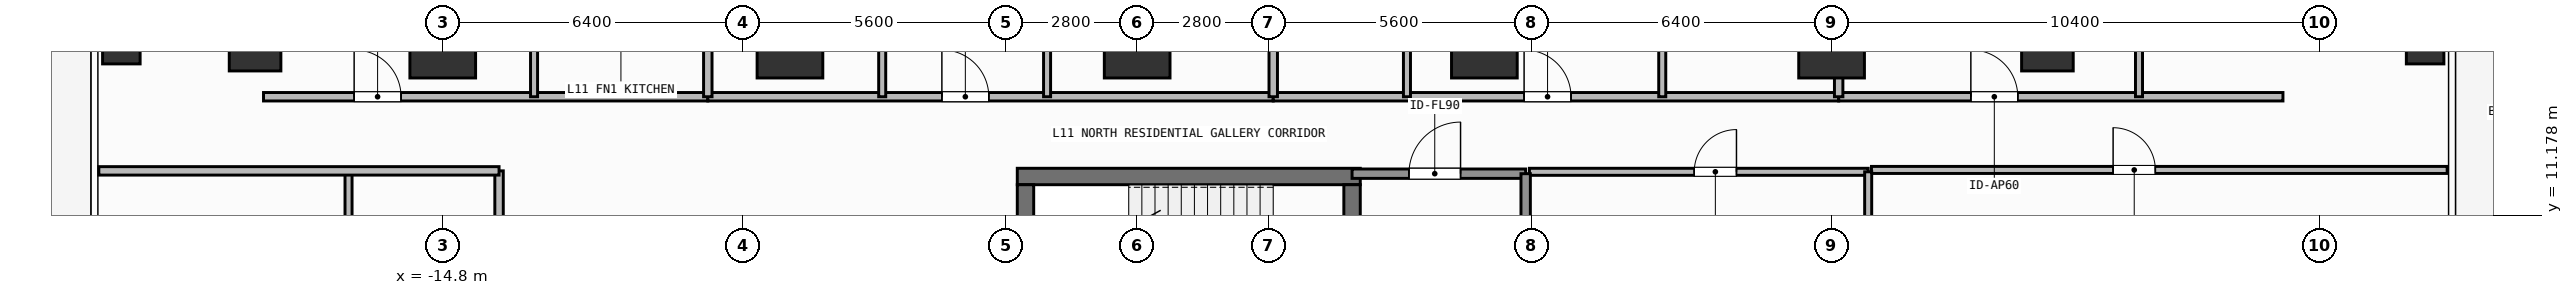
"""IFC4 building model, lengths in metres.
Left out: names, types, materials, properties, quantities, classifications, styles, units other than length and angle.
Written with IfcOpenShell. Run it as: python <this file> out.ifc"""

import sys

from ifc_helpers import new_model, si_unit, direction, frame, frame_2d, origin, origin_2d, place, context, subcontext, project, spatial, rectangle, hollow_rectangle, extrude, element, fill, save


model = new_model("IFC4")
c1 = context("Model", 3, precision=1e-05, world=origin(), true_north=direction((0.0, 1.0)))
c2 = subcontext(c1, "Body", "Model", "MODEL_VIEW")
j1 = project(units=[si_unit("LENGTHUNIT", "METRE"), si_unit("PLANEANGLEUNIT", "RADIAN")], contexts=[c1])
p1 = place(None, origin())
s1 = spatial("IfcSite", under=j1, at=p1, CompositionType="ELEMENT")
p2 = place(p1, origin())
s2 = spatial("IfcBuilding", under=s1, at=p2, CompositionType="ELEMENT")
p3 = place(p2, frame((0.0, 0.0, 42.3)))
s3 = spatial("IfcBuildingStorey", under=s2, at=p3, CompositionType="ELEMENT", Elevation=42.3)
p4 = place(p3, frame((-2.555, 12.0, 0.0), z_axis=(0.0, 0.0, 1.0), x_axis=(1.0, 0.0, 0.0)))
e1 = element("IfcWall", 1, at=p4, inside=s3, PredefinedType="SHEAR", context=c2, shape_type="SweptSolid", body=[
    extrude(rectangle(XDim=7.31, YDim=0.35, at=frame_2d((3.655, 0.0))), origin(), (0.0, 0.0, 1.0), 3.9),
])
p5 = place(p3, frame((-2.38, 8.9, 0.0), z_axis=(0.0, 0.0, 1.0), x_axis=(0.0, 1.0, 0.0)))
e2 = element("IfcWall", 2, at=p5, inside=s3, PredefinedType="SHEAR", context=c2, shape_type="SweptSolid", body=[
    extrude(rectangle(XDim=2.925, YDim=0.35, at=frame_2d((1.462, 0.0))), origin(), (0.0, 0.0, 1.0), 3.9),
])
p6 = place(p3, frame((4.58, 11.825, 0.0), z_axis=(0.0, 0.0, 1.0), x_axis=(0.0, -1.0, 0.0)))
e3 = element("IfcWall", 3, at=p6, inside=s3, PredefinedType="SHEAR", context=c2, shape_type="SweptSolid", body=[
    extrude(rectangle(XDim=2.925, YDim=0.35, at=frame_2d((1.462, 0.0))), origin(), (0.0, 0.0, 1.0), 3.9),
])
p7 = place(p6, frame((0.913, 0.0, 0.0)))
e4 = element("IfcOpeningElement", 4, at=p7, cuts=e3, PredefinedType="OPENING", context=c2, shape_type="SweptSolid", body=[
    extrude(rectangle(XDim=1.1, YDim=2.15, at=frame_2d((0.55, 1.075))), frame((0.0, 0.185, 0.0), z_axis=(0.0, -1.0, 0.0), x_axis=(1.0, 0.0, 0.0)), (0.0, 0.0, 1.0), 0.37),
])
for number, where, z_axis, x_axis in (
    (5, (-14.8, 14.8, 0.0), (0.0, 0.0, 1.0), (1.0, 0.0, 0.0)),
    (6, (-7.4, 14.8, 0.0), (0.0, 0.0, 1.0), (1.0, 0.0, 0.0)),
    (7, (0.0, 14.8, 0.0), (0.0, 0.0, 1.0), (1.0, 0.0, 0.0)),
    (8, (7.4, 14.8, 0.0), (0.0, 0.0, 1.0), (1.0, 0.0, 0.0)),
    (9, (14.8, 14.8, 0.0), (0.0, 0.0, 1.0), (1.0, 0.0, 0.0)),
):
    element("IfcColumn", number, at=place(p3, frame(where, z_axis=z_axis, x_axis=x_axis)), inside=s3, PredefinedType="COLUMN", context=c2, shape_type="SweptSolid", body=[
        extrude(rectangle(XDim=1.4, YDim=1.4, at=origin_2d()), origin(), (0.0, 0.0, 1.0), 3.9),
    ])
for number, where, z_axis, x_axis in (
    (10, (-18.8, 14.8, 0.0), (0.0, 0.0, 1.0), (1.0, 0.0, 0.0)),
    (11, (19.4, 14.8, 0.0), (0.0, 0.0, 1.0), (1.0, 0.0, 0.0)),
):
    element("IfcColumn", number, at=place(p3, frame(where, z_axis=z_axis, x_axis=x_axis)), inside=s3, PredefinedType="COLUMN", context=c2, shape_type="SweptSolid", body=[
        extrude(rectangle(XDim=1.1, YDim=1.1, at=origin_2d()), origin(), (0.0, 0.0, 1.0), 3.9),
    ])
for number, where, z_axis, x_axis in (
    (12, (-21.65, 14.8, 0.0), (0.0, 0.0, 1.0), (1.0, 0.0, 0.0)),
    (13, (27.45, 14.8, 0.0), (0.0, 0.0, 1.0), (1.0, 0.0, 0.0)),
):
    element("IfcColumn", number, at=place(p3, frame(where, z_axis=z_axis, x_axis=x_axis)), inside=s3, PredefinedType="COLUMN", context=c2, shape_type="SweptSolid", body=[
        extrude(hollow_rectangle(XDim=0.8, YDim=0.8, WallThickness=0.036, at=origin_2d()), origin(), (0.0, 0.0, 1.0), 3.9),
    ])
p8 = place(p3, frame((4.58, 12.06, 0.0), z_axis=(0.0, 0.0, 1.0), x_axis=(1.0, 0.0, 0.0)))
e14 = element("IfcWall", 14, at=p8, inside=s3, PredefinedType="SOLIDWALL", context=c2, shape_type="SweptSolid", body=[
    extrude(rectangle(XDim=3.7, YDim=0.2, at=frame_2d((1.85, 0.0))), origin(), (0.0, 0.0, 1.0), 3.68),
])
p9 = place(p8, frame((1.212, 0.0, 0.0)))
e15 = element("IfcOpeningElement", 15, at=p9, cuts=e14, PredefinedType="OPENING", context=c2, shape_type="SweptSolid", body=[
    extrude(rectangle(XDim=1.1, YDim=2.15, at=frame_2d((0.55, 1.075))), frame((0.0, 0.11, 0.0), z_axis=(0.0, -1.0, 0.0), x_axis=(1.0, 0.0, 0.0)), (0.0, 0.0, 1.0), 0.22),
])
p10 = place(p3, frame((8.36, 12.1, 0.0), z_axis=(0.0, 0.0, 1.0), x_axis=(1.0, 0.0, 0.0)))
e16 = element("IfcWall", 16, at=p10, inside=s3, PredefinedType="PARTITIONING", context=c2, shape_type="SweptSolid", body=[
    extrude(rectangle(XDim=7.22, YDim=0.15, at=frame_2d((3.61, 0.0))), origin(), (0.0, 0.0, 1.0), 3.68),
])
p11 = place(p10, frame((3.513, 0.0, 0.0)))
e17 = element("IfcOpeningElement", 17, at=p11, cuts=e16, PredefinedType="OPENING", context=c2, shape_type="SweptSolid", body=[
    extrude(rectangle(XDim=0.9, YDim=2.1, at=frame_2d((0.45, 1.05))), frame((0.0, 0.085, 0.0), z_axis=(0.0, -1.0, 0.0), x_axis=(1.0, 0.0, 0.0)), (0.0, 0.0, 1.0), 0.17),
])
p12 = place(p3, frame((-18.62, 13.7, 0.0), z_axis=(0.0, 0.0, 1.0), x_axis=(1.0, 0.0, 0.0)))
e18 = element("IfcWall", 18, at=p12, inside=s3, PredefinedType="PARTITIONING", context=c2, shape_type="SweptSolid", body=[
    extrude(rectangle(XDim=9.469, YDim=0.18, at=frame_2d((4.735, 0.0))), origin(), (0.0, 0.0, 1.0), 3.68),
])
p13 = place(p12, frame((1.931, 0.0, 0.0)))
e19 = element("IfcOpeningElement", 19, at=p13, cuts=e18, PredefinedType="OPENING", context=c2, shape_type="SweptSolid", body=[
    extrude(rectangle(XDim=1.0, YDim=2.2, at=frame_2d((0.5, 1.1))), frame((0.0, 0.1, 0.0), z_axis=(0.0, -1.0, 0.0), x_axis=(1.0, 0.0, 0.0)), (0.0, 0.0, 1.0), 0.2),
])
p14 = place(p3, frame((-12.854, 13.7, 0.0), z_axis=(0.0, 0.0, 1.0), x_axis=(0.0, 1.0, 0.0)))
e20 = element("IfcWall", 20, at=p14, inside=s3, PredefinedType="PARTITIONING", context=c2, shape_type="SweptSolid", body=[
    extrude(rectangle(XDim=3.899, YDim=0.15, at=frame_2d((1.95, 0.0))), origin(), (0.0, 0.0, 1.0), 3.68),
])
p15 = place(p14, frame((1.865, 0.0, 0.0)))
e21 = element("IfcOpeningElement", 21, at=p15, cuts=e20, PredefinedType="OPENING", context=c2, shape_type="SweptSolid", body=[
    extrude(rectangle(XDim=0.85, YDim=2.1, at=frame_2d((0.425, 1.05))), frame((0.0, 0.085, 0.0), z_axis=(0.0, -1.0, 0.0), x_axis=(1.0, 0.0, 0.0)), (0.0, 0.0, 1.0), 0.17),
])
p16 = place(p3, frame((-9.151, 13.7, 0.0), z_axis=(0.0, 0.0, 1.0), x_axis=(1.0, 0.0, 0.0)))
e22 = element("IfcWall", 22, at=p16, inside=s3, PredefinedType="PARTITIONING", context=c2, shape_type="SweptSolid", body=[
    extrude(rectangle(XDim=12.051, YDim=0.18, at=frame_2d((6.025, 0.0))), origin(), (0.0, 0.0, 1.0), 3.68),
])
p17 = place(p16, frame((4.989, 0.0, 0.0)))
e23 = element("IfcOpeningElement", 23, at=p17, cuts=e22, PredefinedType="OPENING", context=c2, shape_type="SweptSolid", body=[
    extrude(rectangle(XDim=1.0, YDim=2.2, at=frame_2d((0.5, 1.1))), frame((0.0, 0.1, 0.0), z_axis=(0.0, -1.0, 0.0), x_axis=(1.0, 0.0, 0.0)), (0.0, 0.0, 1.0), 0.2),
])
p18 = place(p3, frame((-5.434, 13.7, 0.0), z_axis=(0.0, 0.0, 1.0), x_axis=(0.0, 1.0, 0.0)))
e24 = element("IfcWall", 24, at=p18, inside=s3, PredefinedType="PARTITIONING", context=c2, shape_type="SweptSolid", body=[
    extrude(rectangle(XDim=7.09, YDim=0.15, at=frame_2d((3.545, 0.0))), origin(), (0.0, 0.0, 1.0), 3.68),
])
p19 = place(p18, frame((3.03, 0.0, 0.0)))
e25 = element("IfcOpeningElement", 25, at=p19, cuts=e24, PredefinedType="OPENING", context=c2, shape_type="SweptSolid", body=[
    extrude(rectangle(XDim=0.85, YDim=2.1, at=frame_2d((0.425, 1.05))), frame((0.0, 0.085, 0.0), z_axis=(0.0, -1.0, 0.0), x_axis=(1.0, 0.0, 0.0)), (0.0, 0.0, 1.0), 0.17),
])
p20 = place(p3, frame((-1.92, 13.7, 0.0), z_axis=(0.0, 0.0, 1.0), x_axis=(0.0, 1.0, 0.0)))
e26 = element("IfcWall", 26, at=p20, inside=s3, PredefinedType="PARTITIONING", context=c2, shape_type="SweptSolid", body=[
    extrude(rectangle(XDim=4.963, YDim=0.15, at=frame_2d((2.481, 0.0))), origin(), (0.0, 0.0, 1.0), 3.68),
])
p21 = place(p20, frame((2.056, 0.0, 0.0)))
e27 = element("IfcOpeningElement", 27, at=p21, cuts=e26, PredefinedType="OPENING", context=c2, shape_type="SweptSolid", body=[
    extrude(rectangle(XDim=0.85, YDim=2.1, at=frame_2d((0.425, 1.05))), frame((0.0, 0.085, 0.0), z_axis=(0.0, -1.0, 0.0), x_axis=(1.0, 0.0, 0.0)), (0.0, 0.0, 1.0), 0.17),
])
p22 = place(p3, frame((2.9, 13.7, 0.0), z_axis=(0.0, 0.0, 1.0), x_axis=(1.0, 0.0, 0.0)))
e28 = element("IfcWall", 28, at=p22, inside=s3, PredefinedType="PARTITIONING", context=c2, shape_type="SweptSolid", body=[
    extrude(rectangle(XDim=12.051, YDim=0.18, at=frame_2d((6.025, 0.0))), origin(), (0.0, 0.0, 1.0), 3.68),
])
p23 = place(p22, frame((5.347, 0.0, 0.0)))
e29 = element("IfcOpeningElement", 29, at=p23, cuts=e28, PredefinedType="OPENING", context=c2, shape_type="SweptSolid", body=[
    extrude(rectangle(XDim=1.0, YDim=2.2, at=frame_2d((0.5, 1.1))), frame((0.0, 0.1, 0.0), z_axis=(0.0, -1.0, 0.0), x_axis=(1.0, 0.0, 0.0)), (0.0, 0.0, 1.0), 0.2),
])
p24 = place(p3, frame((5.75, 13.7, 0.0), z_axis=(0.0, 0.0, 1.0), x_axis=(0.0, 1.0, 0.0)))
e30 = element("IfcWall", 30, at=p24, inside=s3, PredefinedType="PARTITIONING", context=c2, shape_type="SweptSolid", body=[
    extrude(rectangle(XDim=7.09, YDim=0.15, at=frame_2d((3.545, 0.0))), origin(), (0.0, 0.0, 1.0), 3.68),
])
p25 = place(p24, frame((3.03, 0.0, 0.0)))
e31 = element("IfcOpeningElement", 31, at=p25, cuts=e30, PredefinedType="OPENING", context=c2, shape_type="SweptSolid", body=[
    extrude(rectangle(XDim=0.85, YDim=2.1, at=frame_2d((0.425, 1.05))), frame((0.0, 0.085, 0.0), z_axis=(0.0, -1.0, 0.0), x_axis=(1.0, 0.0, 0.0)), (0.0, 0.0, 1.0), 0.17),
])
p26 = place(p3, frame((11.191, 13.7, 0.0), z_axis=(0.0, 0.0, 1.0), x_axis=(0.0, 1.0, 0.0)))
e32 = element("IfcWall", 32, at=p26, inside=s3, PredefinedType="PARTITIONING", context=c2, shape_type="SweptSolid", body=[
    extrude(rectangle(XDim=4.857, YDim=0.15, at=frame_2d((2.428, 0.0))), origin(), (0.0, 0.0, 1.0), 3.68),
])
p27 = place(p26, frame((1.916, 0.0, 0.0)))
e33 = element("IfcOpeningElement", 33, at=p27, cuts=e32, PredefinedType="OPENING", context=c2, shape_type="SweptSolid", body=[
    extrude(rectangle(XDim=0.85, YDim=2.1, at=frame_2d((0.425, 1.05))), frame((0.0, 0.085, 0.0), z_axis=(0.0, -1.0, 0.0), x_axis=(1.0, 0.0, 0.0)), (0.0, 0.0, 1.0), 0.17),
])
p28 = place(p3, frame((14.951, 13.7, 0.0), z_axis=(0.0, 0.0, 1.0), x_axis=(1.0, 0.0, 0.0)))
e34 = element("IfcWall", 34, at=p28, inside=s3, PredefinedType="PARTITIONING", context=c2, shape_type="SweptSolid", body=[
    extrude(rectangle(XDim=9.469, YDim=0.18, at=frame_2d((4.734, 0.0))), origin(), (0.0, 0.0, 1.0), 3.68),
])
p29 = place(p28, frame((2.817, 0.0, 0.0)))
e35 = element("IfcOpeningElement", 35, at=p29, cuts=e34, PredefinedType="OPENING", context=c2, shape_type="SweptSolid", body=[
    extrude(rectangle(XDim=1.0, YDim=2.2, at=frame_2d((0.5, 1.1))), frame((0.0, 0.1, 0.0), z_axis=(0.0, -1.0, 0.0), x_axis=(1.0, 0.0, 0.0)), (0.0, 0.0, 1.0), 0.2),
])
p30 = place(p3, frame((21.352, 13.7, 0.0), z_axis=(0.0, 0.0, 1.0), x_axis=(0.0, 1.0, 0.0)))
e36 = element("IfcWall", 36, at=p30, inside=s3, PredefinedType="PARTITIONING", context=c2, shape_type="SweptSolid", body=[
    extrude(rectangle(XDim=3.899, YDim=0.15, at=frame_2d((1.95, 0.0))), origin(), (0.0, 0.0, 1.0), 3.68),
])
p31 = place(p30, frame((1.695, 0.0, 0.0)))
e37 = element("IfcOpeningElement", 37, at=p31, cuts=e36, PredefinedType="OPENING", context=c2, shape_type="SweptSolid", body=[
    extrude(rectangle(XDim=0.85, YDim=2.1, at=frame_2d((0.425, 1.05))), frame((0.0, 0.085, 0.0), z_axis=(0.0, -1.0, 0.0), x_axis=(1.0, 0.0, 0.0)), (0.0, 0.0, 1.0), 0.17),
])
p32 = place(p3, frame((-13.6, -12.12, 0.0), z_axis=(0.0, 0.0, 1.0), x_axis=(0.0, 1.0, 0.0)))
e38 = element("IfcWall", 38, at=p32, inside=s3, PredefinedType="PARTITIONING", context=c2, shape_type="SweptSolid", body=[
    extrude(rectangle(XDim=24.24, YDim=0.18, at=frame_2d((12.12, 0.0))), origin(), (0.0, 0.0, 1.0), 3.68),
])
p33 = place(p32, frame((9.829, 0.0, 0.0)))
e39 = element("IfcOpeningElement", 39, at=p33, cuts=e38, PredefinedType="OPENING", context=c2, shape_type="SweptSolid", body=[
    extrude(rectangle(XDim=1.0, YDim=2.2, at=frame_2d((0.5, 1.1))), frame((0.0, 0.1, 0.0), z_axis=(0.0, -1.0, 0.0), x_axis=(1.0, 0.0, 0.0)), (0.0, 0.0, 1.0), 0.2),
])
p34 = place(p3, frame((15.65, 12.14, 0.0), z_axis=(0.0, 0.0, 1.0), x_axis=(1.0, 0.0, 0.0)))
e40 = element("IfcWall", 40, at=p34, inside=s3, PredefinedType="PARTITIONING", context=c2, shape_type="SweptSolid", body=[
    extrude(rectangle(XDim=12.27, YDim=0.15, at=frame_2d((6.135, 0.0))), origin(), (0.0, 0.0, 1.0), 3.68),
])
p35 = place(p34, frame((5.15, 0.0, 0.0)))
e41 = element("IfcOpeningElement", 41, at=p35, cuts=e40, PredefinedType="OPENING", context=c2, shape_type="SweptSolid", body=[
    extrude(rectangle(XDim=0.9, YDim=2.1, at=frame_2d((0.45, 1.05))), frame((0.0, 0.085, 0.0), z_axis=(0.0, -1.0, 0.0), x_axis=(1.0, 0.0, 0.0)), (0.0, 0.0, 1.0), 0.17),
])
p36 = place(p3, frame((8.28, 8.95, 0.0), z_axis=(0.0, 0.0, 1.0), x_axis=(0.0, 1.0, 0.0)))
e42 = element("IfcWall", 42, at=p36, inside=s3, PredefinedType="SOLIDWALL", context=c2, shape_type="SweptSolid", body=[
    extrude(rectangle(XDim=3.11, YDim=0.2, at=frame_2d((1.555, 0.0))), origin(), (0.0, 0.0, 1.0), 3.68),
])
p37 = place(p3, frame((15.58, 5.85, 0.0), z_axis=(0.0, 0.0, 1.0), x_axis=(0.0, 1.0, 0.0)))
e43 = element("IfcWall", 43, at=p37, inside=s3, PredefinedType="PARTITIONING", context=c2, shape_type="SweptSolid", body=[
    extrude(rectangle(XDim=6.25, YDim=0.15, at=frame_2d((3.125, 0.0))), origin(), (0.0, 0.0, 1.0), 3.68),
])
for number, where, z_axis, x_axis in (
    (44, (-9.151, 13.7, 0.0), (0.0, 0.0, 1.0), (0.0, 1.0, 0.0)),
    (45, (2.9, 13.7, 0.0), (0.0, 0.0, 1.0), (0.0, 1.0, 0.0)),
):
    element("IfcWall", number, at=place(p3, frame(where, z_axis=z_axis, x_axis=x_axis)), inside=s3, PredefinedType="PARTITIONING", context=c2, shape_type="SweptSolid", body=[
        extrude(rectangle(XDim=11.33, YDim=0.18, at=frame_2d((5.665, 0.0))), origin(), (0.0, 0.0, 1.0), 3.68),
    ])
p38 = place(p3, frame((14.951, 13.7, 0.0), z_axis=(0.0, 0.0, 1.0), x_axis=(0.0, 1.0, 0.0)))
e46 = element("IfcWall", 46, at=p38, inside=s3, PredefinedType="PARTITIONING", context=c2, shape_type="SweptSolid", body=[
    extrude(rectangle(XDim=11.33, YDim=0.18, at=frame_2d((5.665, 0.0))), origin(), (0.0, 0.0, 1.0), 3.082),
])
p39 = place(p3, frame((-16.808, 5.436, 0.0), z_axis=(0.0, 0.0, 1.0), x_axis=(0.0, 1.0, 0.0)))
e47 = element("IfcWall", 47, at=p39, inside=s3, PredefinedType="PARTITIONING", context=c2, shape_type="SweptSolid", body=[
    extrude(rectangle(XDim=6.684, YDim=0.15, at=frame_2d((3.342, 0.0))), origin(), (0.0, 0.0, 1.0), 3.68),
])
p40 = place(p3, frame((-22.13, 12.12, 0.0), z_axis=(0.0, 0.0, 1.0), x_axis=(1.0, 0.0, 0.0)))
e48 = element("IfcWall", 48, at=p40, inside=s3, PredefinedType="PARTITIONING", context=c2, shape_type="SweptSolid", body=[
    extrude(rectangle(XDim=8.53, YDim=0.18, at=frame_2d((4.265, 0.0))), origin(), (0.0, 0.0, 1.0), 3.68),
])
p41 = place(p9, origin())
e49 = element("IfcDoor", 49, at=p41, inside=s3, OperationType="SINGLE_SWING_RIGHT", PredefinedType="DOOR", context=c2, shape_type="SweptSolid", body=[
    extrude(rectangle(XDim=1.1, YDim=2.15, at=frame_2d((0.55, 1.075))), frame((0.0, 0.025, 0.0), z_axis=(0.0, -1.0, 0.0), x_axis=(1.0, 0.0, 0.0)), (0.0, 0.0, 1.0), 0.05),
])
fill(e15, e49)
p42 = place(p11, origin())
e50 = element("IfcDoor", 50, at=p42, inside=s3, OperationType="SINGLE_SWING_RIGHT", PredefinedType="DOOR", context=c2, shape_type="SweptSolid", body=[
    extrude(rectangle(XDim=0.9, YDim=2.1, at=frame_2d((0.45, 1.05))), frame((0.0, 0.025, 0.0), z_axis=(0.0, -1.0, 0.0), x_axis=(1.0, 0.0, 0.0)), (0.0, 0.0, 1.0), 0.05),
])
fill(e17, e50)
p43 = place(p13, origin())
e51 = element("IfcDoor", 51, at=p43, inside=s3, OperationType="SINGLE_SWING_LEFT", PredefinedType="DOOR", context=c2, shape_type="SweptSolid", body=[
    extrude(rectangle(XDim=1.0, YDim=2.2, at=frame_2d((0.5, 1.1))), frame((0.0, 0.025, 0.0), z_axis=(0.0, -1.0, 0.0), x_axis=(1.0, 0.0, 0.0)), (0.0, 0.0, 1.0), 0.05),
])
fill(e19, e51)
p44 = place(p17, origin())
e52 = element("IfcDoor", 52, at=p44, inside=s3, OperationType="SINGLE_SWING_LEFT", PredefinedType="DOOR", context=c2, shape_type="SweptSolid", body=[
    extrude(rectangle(XDim=1.0, YDim=2.2, at=frame_2d((0.5, 1.1))), frame((0.0, 0.025, 0.0), z_axis=(0.0, -1.0, 0.0), x_axis=(1.0, 0.0, 0.0)), (0.0, 0.0, 1.0), 0.05),
])
fill(e23, e52)
p45 = place(p23, origin())
e53 = element("IfcDoor", 53, at=p45, inside=s3, OperationType="SINGLE_SWING_LEFT", PredefinedType="DOOR", context=c2, shape_type="SweptSolid", body=[
    extrude(rectangle(XDim=1.0, YDim=2.2, at=frame_2d((0.5, 1.1))), frame((0.0, 0.025, 0.0), z_axis=(0.0, -1.0, 0.0), x_axis=(1.0, 0.0, 0.0)), (0.0, 0.0, 1.0), 0.05),
])
fill(e29, e53)
p46 = place(p29, origin())
e54 = element("IfcDoor", 54, at=p46, inside=s3, OperationType="SINGLE_SWING_LEFT", PredefinedType="DOOR", context=c2, shape_type="SweptSolid", body=[
    extrude(rectangle(XDim=1.0, YDim=2.2, at=frame_2d((0.5, 1.1))), frame((0.0, 0.025, 0.0), z_axis=(0.0, -1.0, 0.0), x_axis=(1.0, 0.0, 0.0)), (0.0, 0.0, 1.0), 0.05),
])
fill(e35, e54)
p47 = place(p35, origin())
e55 = element("IfcDoor", 55, at=p47, inside=s3, OperationType="SINGLE_SWING_LEFT", PredefinedType="DOOR", context=c2, shape_type="SweptSolid", body=[
    extrude(rectangle(XDim=0.9, YDim=2.1, at=frame_2d((0.45, 1.05))), frame((0.0, 0.025, 0.0), z_axis=(0.0, -1.0, 0.0), x_axis=(1.0, 0.0, 0.0)), (0.0, 0.0, 1.0), 0.05),
])
fill(e41, e55)
save(model, sys.argv[1])
